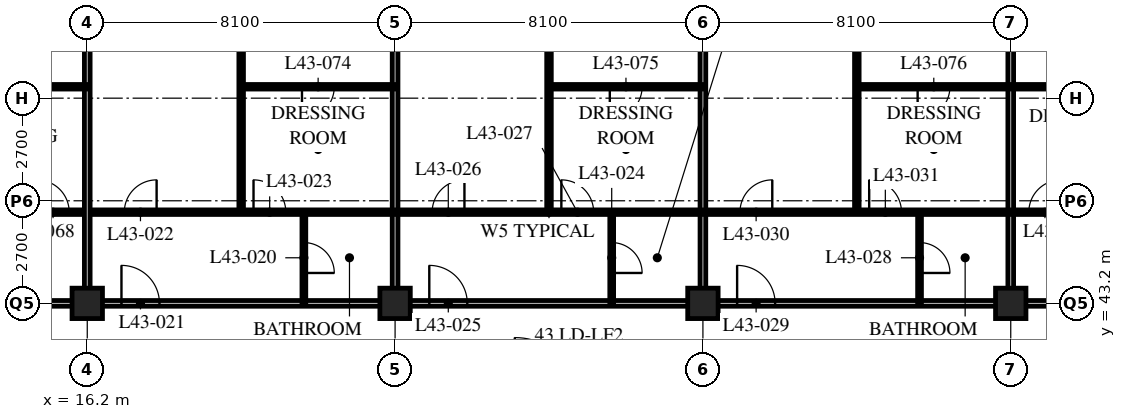
"""IFC4 building model, lengths in metres.
Left out: names, types, materials, properties, quantities, classifications, styles, units other than length and angle.
Written with IfcOpenShell. Run it as: python <this file> out.ifc"""

import sys

from ifc_helpers import new_model, si_unit, direction, frame, frame_2d, origin, origin_2d, place, context, subcontext, project, spatial, rectangle, hollow_rectangle, extrude, element, fill, save


model = new_model("IFC4")
c1 = context("Model", 3, precision=1e-05, world=origin(), true_north=direction((0.0, 1.0)))
c2 = subcontext(c1, "Body", "Model", "MODEL_VIEW")
j1 = project(units=[si_unit("LENGTHUNIT", "METRE"), si_unit("PLANEANGLEUNIT", "RADIAN")], contexts=[c1])
p1 = place(None, origin())
s1 = spatial("IfcSite", under=j1, at=p1, CompositionType="ELEMENT")
p2 = place(p1, origin())
s2 = spatial("IfcBuilding", under=s1, at=p2, CompositionType="ELEMENT")
p3 = place(p2, frame((0.0, 0.0, 170.4)))
s3 = spatial("IfcBuildingStorey", under=s2, at=p3, CompositionType="ELEMENT", Elevation=170.4)
for number, where, z_axis, x_axis in (
    (1, (16.2, 43.2, 0.0), (0.0, 0.0, 1.0), (1.0, 0.0, 0.0)),
    (2, (24.3, 43.2, 0.0), (0.0, 0.0, 1.0), (1.0, 0.0, 0.0)),
    (3, (32.4, 43.2, 0.0), (0.0, 0.0, 1.0), (1.0, 0.0, 0.0)),
    (4, (40.5, 43.2, 0.0), (0.0, 0.0, 1.0), (1.0, 0.0, 0.0)),
):
    element("IfcColumn", number, at=place(p3, frame(where, z_axis=z_axis, x_axis=x_axis)), inside=s3, PredefinedType="COLUMN", context=c2, shape_type="SweptSolid", body=[
        extrude(hollow_rectangle(XDim=0.8, YDim=0.8, WallThickness=0.08, at=origin_2d()), origin(), (0.0, 0.0, 1.0), 3.6),
    ])
p4 = place(p3, frame((12.15, 43.2, 0.0), z_axis=(0.0, 0.0, 1.0), x_axis=(1.0, 0.0, 0.0)))
e5 = element("IfcWall", 5, at=p4, inside=s3, PredefinedType="PARTITIONING", context=c2, shape_type="SweptSolid", body=[
    extrude(rectangle(XDim=32.4, YDim=0.15, at=frame_2d((16.2, 0.0))), origin(), (0.0, 0.0, 1.0), 2.778),
])
p5 = place(p4, frame((4.95, 0.0, 0.0)))
e6 = element("IfcOpeningElement", 6, at=p5, cuts=e5, PredefinedType="OPENING", context=c2, shape_type="SweptSolid", body=[
    extrude(rectangle(XDim=1.0, YDim=2.1, at=frame_2d((0.5, 1.05))), frame((0.0, 0.085, 0.0), z_axis=(0.0, -1.0, 0.0), x_axis=(1.0, 0.0, 0.0)), (0.0, 0.0, 1.0), 0.17),
])
p6 = place(p4, frame((13.05, 0.0, 0.0)))
e7 = element("IfcOpeningElement", 7, at=p6, cuts=e5, PredefinedType="OPENING", context=c2, shape_type="SweptSolid", body=[
    extrude(rectangle(XDim=1.0, YDim=2.1, at=frame_2d((0.5, 1.05))), frame((0.0, 0.085, 0.0), z_axis=(0.0, -1.0, 0.0), x_axis=(1.0, 0.0, 0.0)), (0.0, 0.0, 1.0), 0.17),
])
p7 = place(p4, frame((21.15, 0.0, 0.0)))
e8 = element("IfcOpeningElement", 8, at=p7, cuts=e5, PredefinedType="OPENING", context=c2, shape_type="SweptSolid", body=[
    extrude(rectangle(XDim=1.0, YDim=2.1, at=frame_2d((0.5, 1.05))), frame((0.0, 0.085, 0.0), z_axis=(0.0, -1.0, 0.0), x_axis=(1.0, 0.0, 0.0)), (0.0, 0.0, 1.0), 0.17),
])
p8 = place(p4, frame((29.875, 0.0, 0.0)))
e9 = element("IfcOpeningElement", 9, at=p8, cuts=e5, PredefinedType="OPENING", context=c2, shape_type="SweptSolid", body=[
    extrude(rectangle(XDim=1.0, YDim=2.1, at=frame_2d((0.5, 1.05))), frame((0.0, 0.085, 0.0), z_axis=(0.0, -1.0, 0.0), x_axis=(1.0, 0.0, 0.0)), (0.0, 0.0, 1.0), 0.17),
])
p9 = place(p4, frame((1.525, 0.0, 0.0)))
e10 = element("IfcOpeningElement", 10, at=p9, cuts=e5, PredefinedType="OPENING", context=c2, shape_type="SweptSolid", body=[
    extrude(rectangle(XDim=1.0, YDim=2.1, at=frame_2d((0.5, 1.05))), frame((0.0, 0.085, 0.0), z_axis=(0.0, -1.0, 0.0), x_axis=(1.0, 0.0, 0.0)), (0.0, 0.0, 1.0), 0.17),
])
p10 = place(p3, frame((21.9, 43.2, 0.0), z_axis=(0.0, 0.0, 1.0), x_axis=(0.0, 1.0, 0.0)))
e11 = element("IfcWall", 11, at=p10, inside=s3, PredefinedType="PARTITIONING", context=c2, shape_type="SweptSolid", body=[
    extrude(rectangle(XDim=2.4, YDim=0.1, at=frame_2d((1.2, 0.0))), origin(), (0.0, 0.0, 1.0), 3.39),
])
p11 = place(p10, frame((0.8, 0.0, 0.0)))
e12 = element("IfcOpeningElement", 12, at=p11, cuts=e11, PredefinedType="OPENING", context=c2, shape_type="SweptSolid", body=[
    extrude(rectangle(XDim=0.8, YDim=2.1, at=frame_2d((0.4, 1.05))), frame((0.0, 0.06, 0.0), z_axis=(0.0, -1.0, 0.0), x_axis=(1.0, 0.0, 0.0)), (0.0, 0.0, 1.0), 0.12),
])
p12 = place(p3, frame((20.25, 45.6, 0.0), z_axis=(0.0, 0.0, 1.0), x_axis=(0.0, 1.0, 0.0)))
e13 = element("IfcWall", 13, at=p12, inside=s3, PredefinedType="PARTITIONING", context=c2, shape_type="SweptSolid", body=[
    extrude(rectangle(XDim=13.5, YDim=0.12, at=frame_2d((6.75, 0.0))), origin(), (0.0, 0.0, 1.0), 3.39),
])
p13 = place(p3, frame((24.3, 43.2, 0.0), z_axis=(0.0, 0.0, 1.0), x_axis=(0.0, 1.0, 0.0)))
e14 = element("IfcWall", 14, at=p13, inside=s3, PredefinedType="PARTITIONING", context=c2, shape_type="SweptSolid", body=[
    extrude(rectangle(XDim=15.9, YDim=0.15, at=frame_2d((7.95, 0.0))), origin(), (0.0, 0.0, 1.0), 2.778),
])
p14 = place(p3, frame((30.0, 43.2, 0.0), z_axis=(0.0, 0.0, 1.0), x_axis=(0.0, 1.0, 0.0)))
e15 = element("IfcWall", 15, at=p14, inside=s3, PredefinedType="PARTITIONING", context=c2, shape_type="SweptSolid", body=[
    extrude(rectangle(XDim=2.4, YDim=0.1, at=frame_2d((1.2, 0.0))), origin(), (0.0, 0.0, 1.0), 3.39),
])
p15 = place(p14, frame((0.8, 0.0, 0.0)))
e16 = element("IfcOpeningElement", 16, at=p15, cuts=e15, PredefinedType="OPENING", context=c2, shape_type="SweptSolid", body=[
    extrude(rectangle(XDim=0.8, YDim=2.1, at=frame_2d((0.4, 1.05))), frame((0.0, 0.06, 0.0), z_axis=(0.0, -1.0, 0.0), x_axis=(1.0, 0.0, 0.0)), (0.0, 0.0, 1.0), 0.12),
])
p16 = place(p3, frame((28.35, 45.6, 0.0), z_axis=(0.0, 0.0, 1.0), x_axis=(0.0, 1.0, 0.0)))
e17 = element("IfcWall", 17, at=p16, inside=s3, PredefinedType="PARTITIONING", context=c2, shape_type="SweptSolid", body=[
    extrude(rectangle(XDim=13.5, YDim=0.12, at=frame_2d((6.75, 0.0))), origin(), (0.0, 0.0, 1.0), 3.39),
])
p17 = place(p3, frame((32.4, 43.2, 0.0), z_axis=(0.0, 0.0, 1.0), x_axis=(0.0, 1.0, 0.0)))
e18 = element("IfcWall", 18, at=p17, inside=s3, PredefinedType="PARTITIONING", context=c2, shape_type="SweptSolid", body=[
    extrude(rectangle(XDim=15.9, YDim=0.15, at=frame_2d((7.95, 0.0))), origin(), (0.0, 0.0, 1.0), 2.778),
])
p18 = place(p3, frame((38.1, 43.2, 0.0), z_axis=(0.0, 0.0, 1.0), x_axis=(0.0, 1.0, 0.0)))
e19 = element("IfcWall", 19, at=p18, inside=s3, PredefinedType="PARTITIONING", context=c2, shape_type="SweptSolid", body=[
    extrude(rectangle(XDim=2.4, YDim=0.1, at=frame_2d((1.2, 0.0))), origin(), (0.0, 0.0, 1.0), 3.39),
])
p19 = place(p18, frame((0.8, 0.0, 0.0)))
e20 = element("IfcOpeningElement", 20, at=p19, cuts=e19, PredefinedType="OPENING", context=c2, shape_type="SweptSolid", body=[
    extrude(rectangle(XDim=0.8, YDim=2.1, at=frame_2d((0.4, 1.05))), frame((0.0, 0.06, 0.0), z_axis=(0.0, -1.0, 0.0), x_axis=(1.0, 0.0, 0.0)), (0.0, 0.0, 1.0), 0.12),
])
p20 = place(p3, frame((36.45, 45.6, 0.0), z_axis=(0.0, 0.0, 1.0), x_axis=(0.0, 1.0, 0.0)))
e21 = element("IfcWall", 21, at=p20, inside=s3, PredefinedType="PARTITIONING", context=c2, shape_type="SweptSolid", body=[
    extrude(rectangle(XDim=13.5, YDim=0.12, at=frame_2d((6.75, 0.0))), origin(), (0.0, 0.0, 1.0), 3.39),
])
p21 = place(p3, frame((40.5, 43.2, 0.0), z_axis=(0.0, 0.0, 1.0), x_axis=(0.0, 1.0, 0.0)))
e22 = element("IfcWall", 22, at=p21, inside=s3, PredefinedType="PARTITIONING", context=c2, shape_type="SweptSolid", body=[
    extrude(rectangle(XDim=15.9, YDim=0.15, at=frame_2d((7.95, 0.0))), origin(), (0.0, 0.0, 1.0), 2.778),
])
p22 = place(p3, frame((8.15, 45.6, 0.0), z_axis=(0.0, 0.0, 1.0), x_axis=(1.0, 0.0, 0.0)))
e23 = element("IfcWall", 23, at=p22, inside=s3, PredefinedType="PARTITIONING", context=c2, shape_type="SweptSolid", body=[
    extrude(rectangle(XDim=40.4, YDim=0.12, at=frame_2d((20.2, 0.0))), origin(), (0.0, 0.0, 1.0), 3.39),
])
p23 = place(p22, frame((9.025, 0.0, 0.0)))
e24 = element("IfcOpeningElement", 24, at=p23, cuts=e23, PredefinedType="OPENING", context=c2, shape_type="SweptSolid", body=[
    extrude(rectangle(XDim=0.85, YDim=2.1, at=frame_2d((0.425, 1.05))), frame((0.0, 0.07, 0.0), z_axis=(0.0, -1.0, 0.0), x_axis=(1.0, 0.0, 0.0)), (0.0, 0.0, 1.0), 0.14),
])
p24 = place(p22, frame((12.425, 0.0, 0.0)))
e25 = element("IfcOpeningElement", 25, at=p24, cuts=e23, PredefinedType="OPENING", context=c2, shape_type="SweptSolid", body=[
    extrude(rectangle(XDim=0.85, YDim=2.1, at=frame_2d((0.425, 1.05))), frame((0.0, 0.07, 0.0), z_axis=(0.0, -1.0, 0.0), x_axis=(1.0, 0.0, 0.0)), (0.0, 0.0, 1.0), 0.14),
])
p25 = place(p22, frame((17.125, 0.0, 0.0)))
e26 = element("IfcOpeningElement", 26, at=p25, cuts=e23, PredefinedType="OPENING", context=c2, shape_type="SweptSolid", body=[
    extrude(rectangle(XDim=0.85, YDim=2.1, at=frame_2d((0.425, 1.05))), frame((0.0, 0.07, 0.0), z_axis=(0.0, -1.0, 0.0), x_axis=(1.0, 0.0, 0.0)), (0.0, 0.0, 1.0), 0.14),
])
p26 = place(p22, frame((20.525, 0.0, 0.0)))
e27 = element("IfcOpeningElement", 27, at=p26, cuts=e23, PredefinedType="OPENING", context=c2, shape_type="SweptSolid", body=[
    extrude(rectangle(XDim=0.85, YDim=2.1, at=frame_2d((0.425, 1.05))), frame((0.0, 0.07, 0.0), z_axis=(0.0, -1.0, 0.0), x_axis=(1.0, 0.0, 0.0)), (0.0, 0.0, 1.0), 0.14),
])
p27 = place(p22, frame((25.225, 0.0, 0.0)))
e28 = element("IfcOpeningElement", 28, at=p27, cuts=e23, PredefinedType="OPENING", context=c2, shape_type="SweptSolid", body=[
    extrude(rectangle(XDim=0.85, YDim=2.1, at=frame_2d((0.425, 1.05))), frame((0.0, 0.07, 0.0), z_axis=(0.0, -1.0, 0.0), x_axis=(1.0, 0.0, 0.0)), (0.0, 0.0, 1.0), 0.14),
])
p28 = place(p22, frame((28.625, 0.0, 0.0)))
e29 = element("IfcOpeningElement", 29, at=p28, cuts=e23, PredefinedType="OPENING", context=c2, shape_type="SweptSolid", body=[
    extrude(rectangle(XDim=0.85, YDim=2.1, at=frame_2d((0.425, 1.05))), frame((0.0, 0.07, 0.0), z_axis=(0.0, -1.0, 0.0), x_axis=(1.0, 0.0, 0.0)), (0.0, 0.0, 1.0), 0.14),
])
p29 = place(p22, frame((32.825, 0.0, 0.0)))
e30 = element("IfcOpeningElement", 30, at=p29, cuts=e23, PredefinedType="OPENING", context=c2, shape_type="SweptSolid", body=[
    extrude(rectangle(XDim=0.85, YDim=2.1, at=frame_2d((0.425, 1.05))), frame((0.0, 0.07, 0.0), z_axis=(0.0, -1.0, 0.0), x_axis=(1.0, 0.0, 0.0)), (0.0, 0.0, 1.0), 0.14),
])
p30 = place(p22, frame((36.675, 0.0, 0.0)))
e31 = element("IfcOpeningElement", 31, at=p30, cuts=e23, PredefinedType="OPENING", context=c2, shape_type="SweptSolid", body=[
    extrude(rectangle(XDim=0.85, YDim=2.1, at=frame_2d((0.425, 1.05))), frame((0.0, 0.07, 0.0), z_axis=(0.0, -1.0, 0.0), x_axis=(1.0, 0.0, 0.0)), (0.0, 0.0, 1.0), 0.14),
])
p31 = place(p22, frame((6.725, 0.0, 0.0)))
e32 = element("IfcOpeningElement", 32, at=p31, cuts=e23, PredefinedType="OPENING", context=c2, shape_type="SweptSolid", body=[
    extrude(rectangle(XDim=0.85, YDim=2.1, at=frame_2d((0.425, 1.05))), frame((0.0, 0.07, 0.0), z_axis=(0.0, -1.0, 0.0), x_axis=(1.0, 0.0, 0.0)), (0.0, 0.0, 1.0), 0.14),
])
p32 = place(p22, frame((2.875, 0.0, 0.0)))
e33 = element("IfcOpeningElement", 33, at=p32, cuts=e23, PredefinedType="OPENING", context=c2, shape_type="SweptSolid", body=[
    extrude(rectangle(XDim=0.85, YDim=2.1, at=frame_2d((0.425, 1.05))), frame((0.0, 0.07, 0.0), z_axis=(0.0, -1.0, 0.0), x_axis=(1.0, 0.0, 0.0)), (0.0, 0.0, 1.0), 0.14),
])
p33 = place(p3, frame((16.2, 43.2, 0.0), z_axis=(0.0, 0.0, 1.0), x_axis=(0.0, 1.0, 0.0)))
e34 = element("IfcWall", 34, at=p33, inside=s3, PredefinedType="PARTITIONING", context=c2, shape_type="SweptSolid", body=[
    extrude(rectangle(XDim=15.9, YDim=0.15, at=frame_2d((7.95, 0.0))), origin(), (0.0, 0.0, 1.0), 2.778),
])
p34 = place(p3, frame((20.25, 48.9, 0.0), z_axis=(0.0, 0.0, 1.0), x_axis=(1.0, 0.0, 0.0)))
e35 = element("IfcWall", 35, at=p34, inside=s3, PredefinedType="PARTITIONING", context=c2, shape_type="SweptSolid", body=[
    extrude(rectangle(XDim=4.05, YDim=0.12, at=frame_2d((2.025, 0.0))), origin(), (0.0, 0.0, 1.0), 3.39),
])
p35 = place(p34, frame((1.6, 0.0, 0.0)))
e36 = element("IfcOpeningElement", 36, at=p35, cuts=e35, PredefinedType="OPENING", context=c2, shape_type="SweptSolid", body=[
    extrude(rectangle(XDim=0.85, YDim=2.1, at=frame_2d((0.425, 1.05))), frame((0.0, 0.07, 0.0), z_axis=(0.0, -1.0, 0.0), x_axis=(1.0, 0.0, 0.0)), (0.0, 0.0, 1.0), 0.14),
])
p36 = place(p3, frame((28.35, 48.9, 0.0), z_axis=(0.0, 0.0, 1.0), x_axis=(1.0, 0.0, 0.0)))
e37 = element("IfcWall", 37, at=p36, inside=s3, PredefinedType="PARTITIONING", context=c2, shape_type="SweptSolid", body=[
    extrude(rectangle(XDim=4.05, YDim=0.12, at=frame_2d((2.025, 0.0))), origin(), (0.0, 0.0, 1.0), 3.39),
])
p37 = place(p36, frame((1.6, 0.0, 0.0)))
e38 = element("IfcOpeningElement", 38, at=p37, cuts=e37, PredefinedType="OPENING", context=c2, shape_type="SweptSolid", body=[
    extrude(rectangle(XDim=0.85, YDim=2.1, at=frame_2d((0.425, 1.05))), frame((0.0, 0.07, 0.0), z_axis=(0.0, -1.0, 0.0), x_axis=(1.0, 0.0, 0.0)), (0.0, 0.0, 1.0), 0.14),
])
p38 = place(p3, frame((36.45, 48.9, 0.0), z_axis=(0.0, 0.0, 1.0), x_axis=(1.0, 0.0, 0.0)))
e39 = element("IfcWall", 39, at=p38, inside=s3, PredefinedType="PARTITIONING", context=c2, shape_type="SweptSolid", body=[
    extrude(rectangle(XDim=8.1, YDim=0.12, at=frame_2d((4.05, 0.0))), origin(), (0.0, 0.0, 1.0), 3.39),
])
p39 = place(p38, frame((1.6, 0.0, 0.0)))
e40 = element("IfcOpeningElement", 40, at=p39, cuts=e39, PredefinedType="OPENING", context=c2, shape_type="SweptSolid", body=[
    extrude(rectangle(XDim=0.85, YDim=2.1, at=frame_2d((0.425, 1.05))), frame((0.0, 0.07, 0.0), z_axis=(0.0, -1.0, 0.0), x_axis=(1.0, 0.0, 0.0)), (0.0, 0.0, 1.0), 0.14),
])
p40 = place(p38, frame((5.65, 0.0, 0.0)))
e41 = element("IfcOpeningElement", 41, at=p40, cuts=e39, PredefinedType="OPENING", context=c2, shape_type="SweptSolid", body=[
    extrude(rectangle(XDim=0.85, YDim=2.1, at=frame_2d((0.425, 1.05))), frame((0.0, 0.07, 0.0), z_axis=(0.0, -1.0, 0.0), x_axis=(1.0, 0.0, 0.0)), (0.0, 0.0, 1.0), 0.14),
])
p41 = place(p3, frame((12.15, 48.9, 0.0), z_axis=(0.0, 0.0, 1.0), x_axis=(1.0, 0.0, 0.0)))
e42 = element("IfcWall", 42, at=p41, inside=s3, PredefinedType="PARTITIONING", context=c2, shape_type="SweptSolid", body=[
    extrude(rectangle(XDim=4.05, YDim=0.12, at=frame_2d((2.025, 0.0))), origin(), (0.0, 0.0, 1.0), 3.39),
])
p42 = place(p41, frame((1.6, 0.0, 0.0)))
e43 = element("IfcOpeningElement", 43, at=p42, cuts=e42, PredefinedType="OPENING", context=c2, shape_type="SweptSolid", body=[
    extrude(rectangle(XDim=0.85, YDim=2.1, at=frame_2d((0.425, 1.05))), frame((0.0, 0.07, 0.0), z_axis=(0.0, -1.0, 0.0), x_axis=(1.0, 0.0, 0.0)), (0.0, 0.0, 1.0), 0.14),
])
p43 = place(p11, origin())
e44 = element("IfcDoor", 44, at=p43, inside=s3, OperationType="SINGLE_SWING_RIGHT", PredefinedType="DOOR", context=c2, shape_type="SweptSolid", body=[
    extrude(rectangle(XDim=0.8, YDim=2.1, at=frame_2d((0.4, 1.05))), frame((0.0, 0.025, 0.0), z_axis=(0.0, -1.0, 0.0), x_axis=(1.0, 0.0, 0.0)), (0.0, 0.0, 1.0), 0.05),
])
fill(e12, e44)
p44 = place(p5, origin())
e45 = element("IfcDoor", 45, at=p44, inside=s3, OperationType="SINGLE_SWING_LEFT", PredefinedType="DOOR", context=c2, shape_type="SweptSolid", body=[
    extrude(rectangle(XDim=1.0, YDim=2.1, at=frame_2d((0.5, 1.05))), frame((0.0, 0.025, 0.0), z_axis=(0.0, -1.0, 0.0), x_axis=(1.0, 0.0, 0.0)), (0.0, 0.0, 1.0), 0.05),
])
fill(e6, e45)
p45 = place(p23, origin())
e46 = element("IfcDoor", 46, at=p45, inside=s3, OperationType="SINGLE_SWING_RIGHT", PredefinedType="DOOR", context=c2, shape_type="SweptSolid", body=[
    extrude(rectangle(XDim=0.85, YDim=2.1, at=frame_2d((0.425, 1.05))), frame((0.0, 0.025, 0.0), z_axis=(0.0, -1.0, 0.0), x_axis=(1.0, 0.0, 0.0)), (0.0, 0.0, 1.0), 0.05),
])
fill(e24, e46)
p46 = place(p24, origin())
e47 = element("IfcDoor", 47, at=p46, inside=s3, OperationType="SINGLE_SWING_LEFT", PredefinedType="DOOR", context=c2, shape_type="SweptSolid", body=[
    extrude(rectangle(XDim=0.85, YDim=2.1, at=frame_2d((0.425, 1.05))), frame((0.0, 0.025, 0.0), z_axis=(0.0, -1.0, 0.0), x_axis=(1.0, 0.0, 0.0)), (0.0, 0.0, 1.0), 0.05),
])
fill(e25, e47)
p47 = place(p15, origin())
e48 = element("IfcDoor", 48, at=p47, inside=s3, OperationType="SINGLE_SWING_RIGHT", PredefinedType="DOOR", context=c2, shape_type="SweptSolid", body=[
    extrude(rectangle(XDim=0.8, YDim=2.1, at=frame_2d((0.4, 1.05))), frame((0.0, 0.025, 0.0), z_axis=(0.0, -1.0, 0.0), x_axis=(1.0, 0.0, 0.0)), (0.0, 0.0, 1.0), 0.05),
])
fill(e16, e48)
p48 = place(p6, origin())
e49 = element("IfcDoor", 49, at=p48, inside=s3, OperationType="SINGLE_SWING_LEFT", PredefinedType="DOOR", context=c2, shape_type="SweptSolid", body=[
    extrude(rectangle(XDim=1.0, YDim=2.1, at=frame_2d((0.5, 1.05))), frame((0.0, 0.025, 0.0), z_axis=(0.0, -1.0, 0.0), x_axis=(1.0, 0.0, 0.0)), (0.0, 0.0, 1.0), 0.05),
])
fill(e7, e49)
p49 = place(p25, origin())
e50 = element("IfcDoor", 50, at=p49, inside=s3, OperationType="SINGLE_SWING_RIGHT", PredefinedType="DOOR", context=c2, shape_type="SweptSolid", body=[
    extrude(rectangle(XDim=0.85, YDim=2.1, at=frame_2d((0.425, 1.05))), frame((0.0, 0.025, 0.0), z_axis=(0.0, -1.0, 0.0), x_axis=(1.0, 0.0, 0.0)), (0.0, 0.0, 1.0), 0.05),
])
fill(e26, e50)
p50 = place(p26, origin())
e51 = element("IfcDoor", 51, at=p50, inside=s3, OperationType="SINGLE_SWING_LEFT", PredefinedType="DOOR", context=c2, shape_type="SweptSolid", body=[
    extrude(rectangle(XDim=0.85, YDim=2.1, at=frame_2d((0.425, 1.05))), frame((0.0, 0.025, 0.0), z_axis=(0.0, -1.0, 0.0), x_axis=(1.0, 0.0, 0.0)), (0.0, 0.0, 1.0), 0.05),
])
fill(e27, e51)
p51 = place(p19, origin())
e52 = element("IfcDoor", 52, at=p51, inside=s3, OperationType="SINGLE_SWING_RIGHT", PredefinedType="DOOR", context=c2, shape_type="SweptSolid", body=[
    extrude(rectangle(XDim=0.8, YDim=2.1, at=frame_2d((0.4, 1.05))), frame((0.0, 0.025, 0.0), z_axis=(0.0, -1.0, 0.0), x_axis=(1.0, 0.0, 0.0)), (0.0, 0.0, 1.0), 0.05),
])
fill(e20, e52)
p52 = place(p7, origin())
e53 = element("IfcDoor", 53, at=p52, inside=s3, OperationType="SINGLE_SWING_LEFT", PredefinedType="DOOR", context=c2, shape_type="SweptSolid", body=[
    extrude(rectangle(XDim=1.0, YDim=2.1, at=frame_2d((0.5, 1.05))), frame((0.0, 0.025, 0.0), z_axis=(0.0, -1.0, 0.0), x_axis=(1.0, 0.0, 0.0)), (0.0, 0.0, 1.0), 0.05),
])
fill(e8, e53)
p53 = place(p27, origin())
e54 = element("IfcDoor", 54, at=p53, inside=s3, OperationType="SINGLE_SWING_RIGHT", PredefinedType="DOOR", context=c2, shape_type="SweptSolid", body=[
    extrude(rectangle(XDim=0.85, YDim=2.1, at=frame_2d((0.425, 1.05))), frame((0.0, 0.025, 0.0), z_axis=(0.0, -1.0, 0.0), x_axis=(1.0, 0.0, 0.0)), (0.0, 0.0, 1.0), 0.05),
])
fill(e28, e54)
p54 = place(p28, origin())
e55 = element("IfcDoor", 55, at=p54, inside=s3, OperationType="SINGLE_SWING_LEFT", PredefinedType="DOOR", context=c2, shape_type="SweptSolid", body=[
    extrude(rectangle(XDim=0.85, YDim=2.1, at=frame_2d((0.425, 1.05))), frame((0.0, 0.025, 0.0), z_axis=(0.0, -1.0, 0.0), x_axis=(1.0, 0.0, 0.0)), (0.0, 0.0, 1.0), 0.05),
])
fill(e29, e55)
p55 = place(p29, origin())
e56 = element("IfcDoor", 56, at=p55, inside=s3, OperationType="SINGLE_SWING_RIGHT", PredefinedType="DOOR", context=c2, shape_type="SweptSolid", body=[
    extrude(rectangle(XDim=0.85, YDim=2.1, at=frame_2d((0.425, 1.05))), frame((0.0, 0.025, 0.0), z_axis=(0.0, -1.0, 0.0), x_axis=(1.0, 0.0, 0.0)), (0.0, 0.0, 1.0), 0.05),
])
fill(e30, e56)
p56 = place(p31, origin())
e57 = element("IfcDoor", 57, at=p56, inside=s3, OperationType="SINGLE_SWING_LEFT", PredefinedType="DOOR", context=c2, shape_type="SweptSolid", body=[
    extrude(rectangle(XDim=0.85, YDim=2.1, at=frame_2d((0.425, 1.05))), frame((0.0, 0.025, 0.0), z_axis=(0.0, -1.0, 0.0), x_axis=(1.0, 0.0, 0.0)), (0.0, 0.0, 1.0), 0.05),
])
fill(e32, e57)
p57 = place(p35, origin())
e58 = element("IfcDoor", 58, at=p57, inside=s3, OperationType="SINGLE_SWING_RIGHT", PredefinedType="DOOR", context=c2, shape_type="SweptSolid", body=[
    extrude(rectangle(XDim=0.85, YDim=2.1, at=frame_2d((0.425, 1.05))), frame((0.0, 0.025, 0.0), z_axis=(0.0, -1.0, 0.0), x_axis=(1.0, 0.0, 0.0)), (0.0, 0.0, 1.0), 0.05),
])
fill(e36, e58)
p58 = place(p37, origin())
e59 = element("IfcDoor", 59, at=p58, inside=s3, OperationType="SINGLE_SWING_RIGHT", PredefinedType="DOOR", context=c2, shape_type="SweptSolid", body=[
    extrude(rectangle(XDim=0.85, YDim=2.1, at=frame_2d((0.425, 1.05))), frame((0.0, 0.025, 0.0), z_axis=(0.0, -1.0, 0.0), x_axis=(1.0, 0.0, 0.0)), (0.0, 0.0, 1.0), 0.05),
])
fill(e38, e59)
p59 = place(p39, origin())
e60 = element("IfcDoor", 60, at=p59, inside=s3, OperationType="SINGLE_SWING_RIGHT", PredefinedType="DOOR", context=c2, shape_type="SweptSolid", body=[
    extrude(rectangle(XDim=0.85, YDim=2.1, at=frame_2d((0.425, 1.05))), frame((0.0, 0.025, 0.0), z_axis=(0.0, -1.0, 0.0), x_axis=(1.0, 0.0, 0.0)), (0.0, 0.0, 1.0), 0.05),
])
fill(e40, e60)
save(model, sys.argv[1])
